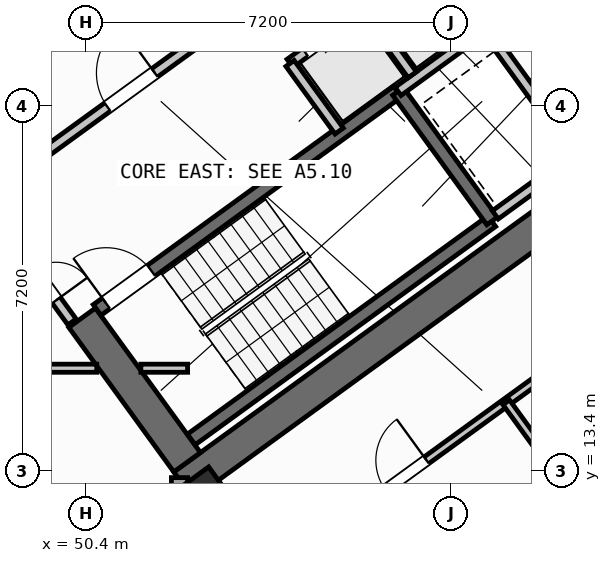
"""IFC4 building model, lengths in metres.
Left out: names, types, materials, properties, quantities, classifications, styles, units other than length and angle.
Written with IfcOpenShell. Run it as: python <this file> out.ifc"""

import sys

from ifc_helpers import new_model, si_unit, direction, frame, frame_2d, origin, origin_2d, place, context, subcontext, project, spatial, rectangle, hollow_rectangle, extrude, source, transform, mapped, element, fill, save


model = new_model("IFC4")
c1 = context("Model", 3, precision=1e-05, world=origin(), true_north=direction((0.0, 1.0)))
c2 = subcontext(c1, "Body", "Model", "MODEL_VIEW")
j1 = project(units=[si_unit("LENGTHUNIT", "METRE"), si_unit("PLANEANGLEUNIT", "RADIAN")], contexts=[c1])
p1 = place(None, origin())
s1 = spatial("IfcSite", under=j1, at=p1, CompositionType="ELEMENT")
p2 = place(p1, origin())
s2 = spatial("IfcBuilding", under=s1, at=p2, CompositionType="ELEMENT")
p3 = place(p2, frame((0.0, 0.0, 42.0)))
s3 = spatial("IfcBuildingStorey", under=s2, at=p3, CompositionType="ELEMENT", Elevation=42.0)
p4 = place(p3, frame((52.318, 13.11, 0.0), z_axis=(0.0, 0.0, 1.0), x_axis=(0.809019445368, 0.587781878776, 0.0)))
e1 = element("IfcWall", 1, at=p4, inside=s3, PredefinedType="SHEAR", context=c2, shape_type="SweptSolid", body=[
    extrude(rectangle(XDim=12.44, YDim=0.65, at=frame_2d((6.22, 0.0))), origin(), (0.0, 0.0, 1.0), 3.35),
])
p5 = place(p3, frame((52.39, 13.564, 0.0), z_axis=(0.0, 0.0, 1.0), x_axis=(-0.58779688989, 0.809008539037, 0.0)))
e2 = element("IfcWall", 2, at=p5, inside=s3, PredefinedType="SHEAR", context=c2, shape_type="SweptSolid", body=[
    extrude(rectangle(XDim=3.525, YDim=0.65, at=frame_2d((1.763, 0.0))), origin(), (0.0, 0.0, 1.0), 3.35),
])
m1 = source(origin(), c2, "Body", "SweptSolid", [
    extrude(hollow_rectangle(XDim=1.0, YDim=1.0, WallThickness=0.04, at=origin_2d()), origin(), (0.0, 0.0, 1.0), 3.6),
])
p6 = place(p3, frame((52.705, 12.773, 0.0), z_axis=(0.0, 0.0, 1.0), x_axis=(0.809016994375, 0.587785252292, 0.0)))
e3 = element("IfcColumn", 3, at=p6, inside=s3, PredefinedType="COLUMN", context=c2, shape_type="MappedRepresentation", body=[
    mapped(m1, transform((0.0, 0.0, 0.0), scale=1.0)),
])
p7 = place(p3, frame((58.455, 35.484, 0.0), z_axis=(0.0, 0.0, 1.0), x_axis=(0.587783625747, -0.809018176127, 0.0)))
e4 = element("IfcWall", 4, at=p7, inside=s3, PredefinedType="STANDARD", context=c2, shape_type="SweptSolid", body=[
    extrude(rectangle(XDim=21.587, YDim=0.32, at=frame_2d((10.794, 0.0))), origin(), (0.0, 0.0, 1.0), 2.725),
])
p8 = place(p7, frame((1.529, 0.0, 0.85)))
e5 = element("IfcOpeningElement", 5, at=p8, cuts=e4, PredefinedType="OPENING", context=c2, shape_type="SweptSolid", body=[
    extrude(rectangle(XDim=1.8, YDim=1.5, at=frame_2d((0.9, 0.75))), frame((0.0, 0.17, 0.0), z_axis=(0.0, -1.0, 0.0), x_axis=(1.0, 0.0, 0.0)), (0.0, 0.0, 1.0), 0.34),
])
p9 = place(p7, frame((10.444, 0.0, 0.85)))
e6 = element("IfcOpeningElement", 6, at=p9, cuts=e4, PredefinedType="OPENING", context=c2, shape_type="SweptSolid", body=[
    extrude(rectangle(XDim=1.8, YDim=1.5, at=frame_2d((0.9, 0.75))), frame((0.0, 0.17, 0.0), z_axis=(0.0, -1.0, 0.0), x_axis=(1.0, 0.0, 0.0)), (0.0, 0.0, 1.0), 0.34),
])
p10 = place(p7, frame((17.595, 0.0, 0.85)))
e7 = element("IfcOpeningElement", 7, at=p10, cuts=e4, PredefinedType="OPENING", context=c2, shape_type="SweptSolid", body=[
    extrude(rectangle(XDim=1.5, YDim=1.5, at=frame_2d((0.75, 0.75))), frame((0.0, 0.17, 0.0), z_axis=(0.0, -1.0, 0.0), x_axis=(1.0, 0.0, 0.0)), (0.0, 0.0, 1.0), 0.34),
])
p11 = place(p3, frame((71.098, 17.731, 0.0), z_axis=(0.0, 0.0, 1.0), x_axis=(-0.809021120468, -0.587779573171, 0.0)))
e8 = element("IfcWall", 8, at=p11, inside=s3, PredefinedType="STANDARD", context=c2, shape_type="SweptSolid", body=[
    extrude(rectangle(XDim=17.588, YDim=0.32, at=frame_2d((8.794, 0.0))), origin(), (0.0, 0.0, 1.0), 3.35),
])
p12 = place(p11, frame((1.624, 0.0, 0.0)))
e9 = element("IfcOpeningElement", 9, at=p12, cuts=e8, PredefinedType="OPENING", context=c2, shape_type="SweptSolid", body=[
    extrude(rectangle(XDim=1.05, YDim=2.15, at=frame_2d((0.525, 1.075))), frame((0.0, 0.17, 0.0), z_axis=(0.0, -1.0, 0.0), x_axis=(1.0, 0.0, 0.0)), (0.0, 0.0, 1.0), 0.34),
])
p13 = place(p11, frame((4.104, 0.0, 1.0)))
e10 = element("IfcOpeningElement", 10, at=p13, cuts=e8, PredefinedType="OPENING", context=c2, shape_type="SweptSolid", body=[
    extrude(rectangle(XDim=0.9, YDim=1.25, at=frame_2d((0.45, 0.625))), frame((0.0, 0.17, 0.0), z_axis=(0.0, -1.0, 0.0), x_axis=(1.0, 0.0, 0.0)), (0.0, 0.0, 1.0), 0.34),
])
p14 = place(p11, frame((7.879, 0.0, 0.85)))
e11 = element("IfcOpeningElement", 11, at=p14, cuts=e8, PredefinedType="OPENING", context=c2, shape_type="SweptSolid", body=[
    extrude(rectangle(XDim=1.8, YDim=1.5, at=frame_2d((0.9, 0.75))), frame((0.0, 0.17, 0.0), z_axis=(0.0, -1.0, 0.0), x_axis=(1.0, 0.0, 0.0)), (0.0, 0.0, 1.0), 0.34),
])
p15 = place(p11, frame((13.529, 0.0, 0.85)))
e12 = element("IfcOpeningElement", 12, at=p15, cuts=e8, PredefinedType="OPENING", context=c2, shape_type="SweptSolid", body=[
    extrude(rectangle(XDim=1.5, YDim=1.5, at=frame_2d((0.75, 0.75))), frame((0.0, 0.17, 0.0), z_axis=(0.0, -1.0, 0.0), x_axis=(1.0, 0.0, 0.0)), (0.0, 0.0, 1.0), 0.34),
])
p16 = place(p3, frame((52.24, 13.261, 0.0), z_axis=(0.0, 0.0, 1.0), x_axis=(0.0, -1.0, 0.0)))
e13 = element("IfcWall", 13, at=p16, inside=s3, PredefinedType="STANDARD", context=c2, shape_type="SweptSolid", body=[
    extrude(rectangle(XDim=9.795, YDim=0.32, at=frame_2d((4.897, 0.0))), origin(), (0.0, 0.0, 1.0), 3.35),
])
p17 = place(p16, frame((2.199, 0.0, 0.8)))
e14 = element("IfcOpeningElement", 14, at=p17, cuts=e13, PredefinedType="OPENING", context=c2, shape_type="SweptSolid", body=[
    extrude(rectangle(XDim=2.1, YDim=1.55, at=frame_2d((1.05, 0.775))), frame((0.0, 0.17, 0.0), z_axis=(0.0, -1.0, 0.0), x_axis=(1.0, 0.0, 0.0)), (0.0, 0.0, 1.0), 0.34),
])
p18 = place(p16, frame((6.88, 0.0, 0.85)))
e15 = element("IfcOpeningElement", 15, at=p18, cuts=e13, PredefinedType="OPENING", context=c2, shape_type="SweptSolid", body=[
    extrude(rectangle(XDim=1.8, YDim=1.5, at=frame_2d((0.9, 0.75))), frame((0.0, 0.17, 0.0), z_axis=(0.0, -1.0, 0.0), x_axis=(1.0, 0.0, 0.0)), (0.0, 0.0, 1.0), 0.34),
])
p19 = place(p3, frame((52.472, 14.013, 0.0), z_axis=(0.0, 0.0, 1.0), x_axis=(0.809028366311, 0.587769599847, 0.0)))
e16 = element("IfcWall", 16, at=p19, inside=s3, PredefinedType="SHEAR", context=c2, shape_type="SweptSolid", body=[
    extrude(rectangle(XDim=7.33, YDim=0.26, at=frame_2d((3.665, 0.0))), origin(), (0.0, 0.0, 1.0), 3.35),
])
p20 = place(p3, frame((50.615, 16.57, 0.0), z_axis=(0.0, 0.0, 1.0), x_axis=(0.809028366311, 0.587769599847, 0.0)))
e17 = element("IfcWall", 17, at=p20, inside=s3, PredefinedType="SHEAR", context=c2, shape_type="SweptSolid", body=[
    extrude(rectangle(XDim=7.33, YDim=0.26, at=frame_2d((3.665, 0.0))), origin(), (0.0, 0.0, 1.0), 3.35),
])
p21 = place(p20, frame((0.22, 0.0, 0.0)))
e18 = element("IfcOpeningElement", 18, at=p21, cuts=e17, PredefinedType="OPENING", context=c2, shape_type="SweptSolid", body=[
    extrude(rectangle(XDim=1.1, YDim=2.1, at=frame_2d((0.55, 1.05))), frame((0.0, 0.14, 0.0), z_axis=(0.0, -1.0, 0.0), x_axis=(1.0, 0.0, 0.0)), (0.0, 0.0, 1.0), 0.28),
])
p22 = place(p3, frame((58.41, 18.327, 0.0), z_axis=(0.0, 0.0, 1.0), x_axis=(-0.58776738483, 0.809029975545, 0.0)))
e19 = element("IfcWall", 19, at=p22, inside=s3, PredefinedType="SHEAR", context=c2, shape_type="SweptSolid", body=[
    extrude(rectangle(XDim=3.16, YDim=0.26, at=frame_2d((1.58, 0.0))), origin(), (0.0, 0.0, 1.0), 3.35),
])
p23 = place(p3, frame((47.106, 21.437, 0.0), z_axis=(0.0, 0.0, 1.0), x_axis=(0.809012514015, 0.58779141893, 0.0)))
e20 = element("IfcWall", 20, at=p23, inside=s3, PredefinedType="STANDARD", context=c2, shape_type="SweptSolid", body=[
    extrude(rectangle(XDim=3.398, YDim=0.2, at=frame_2d((1.699, 0.0))), origin(), (0.0, 0.0, 1.0), 3.34),
])
p24 = place(p23, frame((0.408, 0.0, 0.0)))
e21 = element("IfcOpeningElement", 21, at=p24, cuts=e20, PredefinedType="OPENING", context=c2, shape_type="SweptSolid", body=[
    extrude(rectangle(XDim=1.3, YDim=2.2, at=frame_2d((0.65, 1.1))), frame((0.0, 0.11, 0.0), z_axis=(0.0, -1.0, 0.0), x_axis=(1.0, 0.0, 0.0)), (0.0, 0.0, 1.0), 0.22),
])
p25 = place(p3, frame((48.799, 19.107, 0.0), z_axis=(0.0, 0.0, 1.0), x_axis=(0.809012959416, 0.587790805897, 0.0)))
e22 = element("IfcWall", 22, at=p25, inside=s3, PredefinedType="STANDARD", context=c2, shape_type="SweptSolid", body=[
    extrude(rectangle(XDim=5.718, YDim=0.2, at=frame_2d((2.859, 0.0))), origin(), (0.0, 0.0, 1.0), 3.34),
])
p26 = place(p25, frame((2.498, 0.0, 0.0)))
e23 = element("IfcOpeningElement", 23, at=p26, cuts=e22, PredefinedType="OPENING", context=c2, shape_type="SweptSolid", body=[
    extrude(rectangle(XDim=1.15, YDim=2.1, at=frame_2d((0.575, 1.05))), frame((0.0, 0.11, 0.0), z_axis=(0.0, -1.0, 0.0), x_axis=(1.0, 0.0, 0.0)), (0.0, 0.0, 1.0), 0.22),
])
p27 = place(p3, frame((56.553, 20.884, 0.0), z_axis=(0.0, 0.0, 1.0), x_axis=(0.809035789462, 0.587759382205, 0.0)))
e24 = element("IfcWall", 24, at=p27, inside=s3, PredefinedType="STANDARD", context=c2, shape_type="SweptSolid", body=[
    extrude(rectangle(XDim=3.768, YDim=0.2, at=frame_2d((1.884, 0.0))), origin(), (0.0, 0.0, 1.0), 3.34),
])
p28 = place(p27, frame((2.65, 0.0, 0.0)))
e25 = element("IfcOpeningElement", 25, at=p28, cuts=e24, PredefinedType="OPENING", context=c2, shape_type="SweptSolid", body=[
    extrude(rectangle(XDim=0.86, YDim=2.05, at=frame_2d((0.43, 1.025))), frame((0.0, 0.11, 0.0), z_axis=(0.0, -1.0, 0.0), x_axis=(1.0, 0.0, 0.0)), (0.0, 0.0, 1.0), 0.22),
])
p29 = place(p3, frame((54.421, 21.436, 0.0), z_axis=(0.0, 0.0, 1.0), x_axis=(0.809013710463, 0.587789772183, 0.0)))
e26 = element("IfcWall", 26, at=p29, inside=s3, PredefinedType="STANDARD", context=c2, shape_type="SweptSolid", body=[
    extrude(rectangle(XDim=5.36, YDim=0.2, at=frame_2d((2.68, 0.0))), origin(), (0.0, 0.0, 1.0), 3.34),
])
p30 = place(p29, frame((0.37, 0.0, 0.0)))
e27 = element("IfcOpeningElement", 27, at=p30, cuts=e26, PredefinedType="OPENING", context=c2, shape_type="SweptSolid", body=[
    extrude(rectangle(XDim=1.1, YDim=2.15, at=frame_2d((0.55, 1.075))), frame((0.0, 0.11, 0.0), z_axis=(0.0, -1.0, 0.0), x_axis=(1.0, 0.0, 0.0)), (0.0, 0.0, 1.0), 0.22),
])
p31 = place(p29, frame((2.17, 0.0, 0.0)))
e28 = element("IfcOpeningElement", 28, at=p31, cuts=e26, PredefinedType="OPENING", context=c2, shape_type="SweptSolid", body=[
    extrude(rectangle(XDim=1.1, YDim=2.15, at=frame_2d((0.55, 1.075))), frame((0.0, 0.11, 0.0), z_axis=(0.0, -1.0, 0.0), x_axis=(1.0, 0.0, 0.0)), (0.0, 0.0, 1.0), 0.22),
])
p32 = place(p29, frame((3.97, 0.0, 0.0)))
e29 = element("IfcOpeningElement", 29, at=p32, cuts=e26, PredefinedType="OPENING", context=c2, shape_type="SweptSolid", body=[
    extrude(rectangle(XDim=1.1, YDim=2.15, at=frame_2d((0.55, 1.075))), frame((0.0, 0.11, 0.0), z_axis=(0.0, -1.0, 0.0), x_axis=(1.0, 0.0, 0.0)), (0.0, 0.0, 1.0), 0.22),
])
p33 = place(p3, frame((55.391, 20.102, 0.0), z_axis=(0.0, 0.0, 1.0), x_axis=(-0.58778447739, 0.809017557374, 0.0)))
e30 = element("IfcWall", 30, at=p33, inside=s3, PredefinedType="STANDARD", context=c2, shape_type="SweptSolid", body=[
    extrude(rectangle(XDim=1.65, YDim=0.2, at=frame_2d((0.825, 0.0))), origin(), (0.0, 0.0, 1.0), 3.34),
])
p34 = place(p3, frame((56.834, 21.212, 0.0), z_axis=(0.0, 0.0, 1.0), x_axis=(-0.58776738483, 0.809029975545, 0.0)))
e31 = element("IfcWall", 31, at=p34, inside=s3, PredefinedType="STANDARD", context=c2, shape_type="SweptSolid", body=[
    extrude(rectangle(XDim=1.58, YDim=0.2, at=frame_2d((0.79, 0.0))), origin(), (0.0, 0.0, 1.0), 3.34),
])
p35 = place(p3, frame((60.067, 19.655, 0.0), z_axis=(0.0, 0.0, 1.0), x_axis=(-0.587800520745, 0.809005900975, 0.0)))
e32 = element("IfcWall", 32, at=p35, inside=s3, PredefinedType="STANDARD", context=c2, shape_type="SweptSolid", body=[
    extrude(rectangle(XDim=2.66, YDim=0.2, at=frame_2d((1.33, 0.0))), origin(), (0.0, 0.0, 1.0), 3.34),
])
p36 = place(p3, frame((58.472, 18.447, 0.0), z_axis=(0.0, 0.0, 1.0), x_axis=(0.809022487728, 0.587777691266, 0.0)))
e33 = element("IfcWall", 33, at=p36, inside=s3, PredefinedType="STANDARD", context=c2, shape_type="SweptSolid", body=[
    extrude(rectangle(XDim=3.648, YDim=0.2, at=frame_2d((1.824, 0.0))), origin(), (0.0, 0.0, 1.0), 3.34),
])
p37 = place(p3, frame((35.296, 15.42, 0.0), z_axis=(0.0, 0.0, 1.0), x_axis=(1.0, 0.0, 0.0)))
e34 = element("IfcWall", 34, at=p37, inside=s3, PredefinedType="PARTITIONING", context=c2, shape_type="SweptSolid", body=[
    extrude(rectangle(XDim=15.311, YDim=0.16, at=frame_2d((7.655, 0.0))), origin(), (0.0, 0.0, 1.0), 3.34),
])
p38 = place(p37, frame((0.91, 0.0, 0.0)))
e35 = element("IfcOpeningElement", 35, at=p38, cuts=e34, PredefinedType="OPENING", context=c2, shape_type="SweptSolid", body=[
    extrude(rectangle(XDim=1.0, YDim=2.1, at=frame_2d((0.5, 1.05))), frame((0.0, 0.09, 0.0), z_axis=(0.0, -1.0, 0.0), x_axis=(1.0, 0.0, 0.0)), (0.0, 0.0, 1.0), 0.18),
])
p39 = place(p37, frame((8.74, 0.0, 0.0)))
e36 = element("IfcOpeningElement", 36, at=p39, cuts=e34, PredefinedType="OPENING", context=c2, shape_type="SweptSolid", body=[
    extrude(rectangle(XDim=1.0, YDim=2.1, at=frame_2d((0.5, 1.05))), frame((0.0, 0.09, 0.0), z_axis=(0.0, -1.0, 0.0), x_axis=(1.0, 0.0, 0.0)), (0.0, 0.0, 1.0), 0.18),
])
p40 = place(p3, frame((51.477, 15.42, 0.0), z_axis=(0.0, 0.0, 1.0), x_axis=(1.0, 0.0, 0.0)))
e37 = element("IfcWall", 37, at=p40, inside=s3, PredefinedType="PARTITIONING", context=c2, shape_type="SweptSolid", body=[
    extrude(rectangle(XDim=0.923, YDim=0.16, at=frame_2d((0.461, 0.0))), origin(), (0.0, 0.0, 1.0), 3.34),
])
p41 = place(p3, frame((50.119, 16.333, 0.0), z_axis=(0.0, 0.0, 1.0), x_axis=(-0.587749856981, 0.809042709391, 0.0)))
e38 = element("IfcWall", 38, at=p41, inside=s3, PredefinedType="STANDARD", context=c2, shape_type="SweptSolid", body=[
    extrude(rectangle(XDim=2.96, YDim=0.2, at=frame_2d((1.48, 0.0))), origin(), (0.0, 0.0, 1.0), 3.34),
])
p42 = place(p41, frame((0.53, 0.0, 0.0)))
e39 = element("IfcOpeningElement", 39, at=p42, cuts=e38, PredefinedType="OPENING", context=c2, shape_type="SweptSolid", body=[
    extrude(rectangle(XDim=1.5, YDim=2.15, at=frame_2d((0.75, 1.075))), frame((0.0, 0.11, 0.0), z_axis=(0.0, -1.0, 0.0), x_axis=(1.0, 0.0, 0.0)), (0.0, 0.0, 1.0), 0.22),
])
p43 = place(p3, frame((53.705, 11.126, 0.0), z_axis=(0.0, 0.0, 1.0), x_axis=(0.809014504436, 0.587788679384, 0.0)))
e40 = element("IfcWall", 40, at=p43, inside=s3, PredefinedType="PARTITIONING", context=c2, shape_type="SweptSolid", body=[
    extrude(rectangle(XDim=14.67, YDim=0.16, at=frame_2d((7.335, 0.0))), origin(), (0.0, 0.0, 1.0), 3.34),
])
p44 = place(p43, frame((3.215, 0.0, 0.0)))
e41 = element("IfcOpeningElement", 41, at=p44, cuts=e40, PredefinedType="OPENING", context=c2, shape_type="SweptSolid", body=[
    extrude(rectangle(XDim=1.0, YDim=2.1, at=frame_2d((0.5, 1.05))), frame((0.0, 0.09, 0.0), z_axis=(0.0, -1.0, 0.0), x_axis=(1.0, 0.0, 0.0)), (0.0, 0.0, 1.0), 0.18),
])
p45 = place(p43, frame((9.915, 0.0, 0.0)))
e42 = element("IfcOpeningElement", 42, at=p45, cuts=e40, PredefinedType="OPENING", context=c2, shape_type="SweptSolid", body=[
    extrude(rectangle(XDim=1.0, YDim=2.1, at=frame_2d((0.5, 1.05))), frame((0.0, 0.09, 0.0), z_axis=(0.0, -1.0, 0.0), x_axis=(1.0, 0.0, 0.0)), (0.0, 0.0, 1.0), 0.18),
])
p46 = place(p3, frame((61.539, 10.823, 0.0), z_axis=(0.0, 0.0, 1.0), x_axis=(-0.587785532001, 0.809016791155, 0.0)))
e43 = element("IfcWall", 43, at=p46, inside=s3, PredefinedType="PARTITIONING", context=c2, shape_type="SweptSolid", body=[
    extrude(rectangle(XDim=4.85, YDim=0.16, at=frame_2d((2.425, 0.0))), origin(), (0.0, 0.0, 1.0), 3.34),
])
m2 = source(origin(), c2, "Body", "SweptSolid", [
    extrude(rectangle(XDim=1.1, YDim=2.1, at=frame_2d((0.55, 1.05))), frame((0.0, 0.025, 0.0), z_axis=(0.0, -1.0, 0.0), x_axis=(1.0, 0.0, 0.0)), (0.0, 0.0, 1.0), 0.05),
])
p47 = place(p21, origin())
e44 = element("IfcDoor", 44, at=p47, inside=s3, OperationType="SINGLE_SWING_LEFT", PredefinedType="DOOR", context=c2, shape_type="MappedRepresentation", body=[
    mapped(m2, transform((0.0, 0.0, 0.0), scale=1.0)),
])
fill(e18, e44)
m3 = source(origin(), c2, "Body", "SweptSolid", [
    extrude(rectangle(XDim=1.15, YDim=2.1, at=frame_2d((0.575, 1.05))), frame((0.0, 0.025, 0.0), z_axis=(0.0, -1.0, 0.0), x_axis=(1.0, 0.0, 0.0)), (0.0, 0.0, 1.0), 0.05),
])
p48 = place(p26, origin())
e45 = element("IfcDoor", 45, at=p48, inside=s3, OperationType="SINGLE_SWING_RIGHT", PredefinedType="DOOR", context=c2, shape_type="MappedRepresentation", body=[
    mapped(m3, transform((0.0, 0.0, 0.0), scale=1.0)),
])
fill(e23, e45)
m4 = source(origin(), c2, "Body", "SweptSolid", [
    extrude(rectangle(XDim=1.1, YDim=2.15, at=frame_2d((0.55, 1.075))), frame((0.0, 0.025, 0.0), z_axis=(0.0, -1.0, 0.0), x_axis=(1.0, 0.0, 0.0)), (0.0, 0.0, 1.0), 0.05),
])
p49 = place(p30, origin())
e46 = element("IfcDoor", 46, at=p49, inside=s3, OperationType="DOUBLE_DOOR_SLIDING", PredefinedType="DOOR", context=c2, shape_type="MappedRepresentation", body=[
    mapped(m4, transform((0.0, 0.0, 0.0), scale=1.0)),
])
fill(e27, e46)
m5 = source(origin(), c2, "Body", "SweptSolid", [
    extrude(rectangle(XDim=1.5, YDim=2.15, at=frame_2d((0.75, 1.075))), frame((0.0, 0.025, 0.0), z_axis=(0.0, -1.0, 0.0), x_axis=(1.0, 0.0, 0.0)), (0.0, 0.0, 1.0), 0.05),
])
p50 = place(p42, frame((1.5, 0.0, 0.0), z_axis=(0.0, 0.0, 1.0), x_axis=(-1.0, 0.0, 0.0)))
e47 = element("IfcDoor", 47, at=p50, inside=s3, OperationType="DOUBLE_DOOR_SINGLE_SWING", PredefinedType="DOOR", context=c2, shape_type="MappedRepresentation", body=[
    mapped(m5, transform((0.0, 0.0, 0.0), scale=1.0)),
])
fill(e39, e47)
m6 = source(origin(), c2, "Body", "SweptSolid", [
    extrude(rectangle(XDim=1.0, YDim=2.1, at=frame_2d((0.5, 1.05))), frame((0.0, 0.025, 0.0), z_axis=(0.0, -1.0, 0.0), x_axis=(1.0, 0.0, 0.0)), (0.0, 0.0, 1.0), 0.05),
])
p51 = place(p44, origin())
e48 = element("IfcDoor", 48, at=p51, inside=s3, OperationType="SINGLE_SWING_RIGHT", PredefinedType="DOOR", context=c2, shape_type="MappedRepresentation", body=[
    mapped(m6, transform((0.0, 0.0, 0.0), scale=1.0)),
])
fill(e41, e48)
save(model, sys.argv[1])
